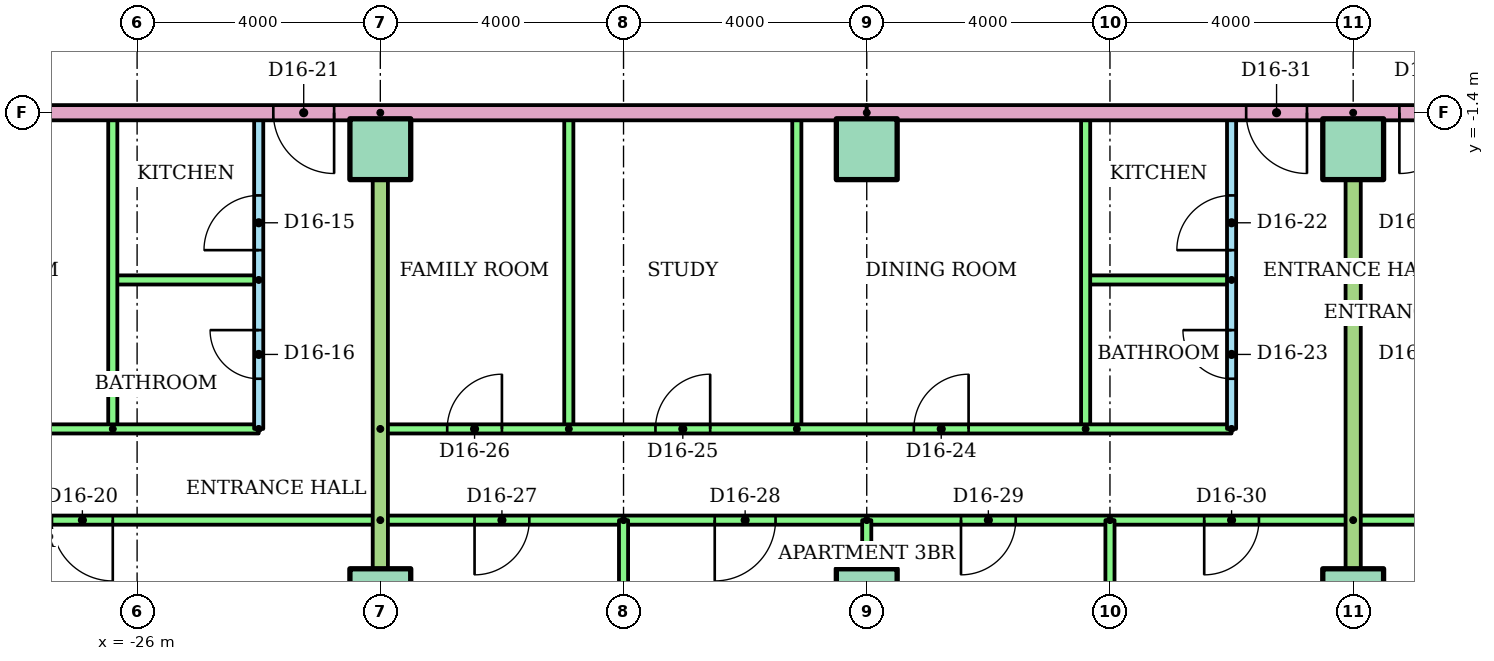
"""IFC4 building model, lengths in metres.
Left out: names, types, materials, properties, quantities, classifications, styles, units other than length and angle.
Written with IfcOpenShell. Run it as: python <this file> out.ifc"""

import sys

from ifc_helpers import new_model, si_unit, direction, frame, frame_2d, origin, origin_2d, place, context, subcontext, project, spatial, rectangle, extrude, element, fill, save


model = new_model("IFC4")
c1 = context("Model", 3, precision=1e-05, world=origin(), true_north=direction((0.0, 1.0)))
c2 = subcontext(c1, "Body", "Model", "MODEL_VIEW")
j1 = project(units=[si_unit("LENGTHUNIT", "METRE"), si_unit("PLANEANGLEUNIT", "RADIAN")], contexts=[c1])
p1 = place(None, origin())
s1 = spatial("IfcSite", under=j1, at=p1, CompositionType="ELEMENT")
p2 = place(p1, origin())
s2 = spatial("IfcBuilding", under=s1, at=p2, CompositionType="ELEMENT")
p3 = place(p2, frame((0.0, 0.0, 60.8)))
s3 = spatial("IfcBuildingStorey", under=s2, at=p3, CompositionType="ELEMENT", Elevation=60.8)
for number, where in (
    (1, (-22.0, -9.4, 0.0)),
    (2, (-14.0, -9.4, 0.0)),
    (3, (-6.0, -9.4, 0.0)),
    (4, (-22.0, -2.0, 0.0)),
    (5, (-14.0, -2.0, 0.0)),
    (6, (-6.0, -2.0, 0.0)),
):
    element("IfcColumn", number, at=place(p3, frame(where)), inside=s3, PredefinedType="COLUMN", context=c2, shape_type="SweptSolid", body=[
        extrude(rectangle(XDim=1.0, YDim=1.0, at=origin_2d()), origin(), (0.0, 0.0, 1.0), 3.2),
    ])
p4 = place(p3, frame((-24.0, -6.6, 0.0), z_axis=(0.0, 0.0, 1.0), x_axis=(0.0, 1.0, 0.0)))
e7 = element("IfcWall", 7, at=p4, inside=s3, PredefinedType="PARTITIONING", context=c2, shape_type="SweptSolid", body=[
    extrude(rectangle(XDim=5.2, YDim=0.15, at=frame_2d((2.6, 0.0))), origin(), (0.0, 0.0, 1.0), 2.4),
])
p5 = place(p4, frame((2.94, 0.0, 0.0)))
e8 = element("IfcOpeningElement", 8, at=p5, cuts=e7, PredefinedType="OPENING", context=c2, shape_type="SweptSolid", body=[
    extrude(rectangle(XDim=0.9, YDim=2.1, at=frame_2d((0.45, 1.05))), frame((0.0, 0.085, 0.0), z_axis=(0.0, -1.0, 0.0), x_axis=(1.0, 0.0, 0.0)), (0.0, 0.0, 1.0), 0.17),
])
p6 = place(p4, frame((0.825, 0.0, 0.0)))
e9 = element("IfcOpeningElement", 9, at=p6, cuts=e7, PredefinedType="OPENING", context=c2, shape_type="SweptSolid", body=[
    extrude(rectangle(XDim=0.8, YDim=2.1, at=frame_2d((0.4, 1.05))), frame((0.0, 0.085, 0.0), z_axis=(0.0, -1.0, 0.0), x_axis=(1.0, 0.0, 0.0)), (0.0, 0.0, 1.0), 0.17),
])
p7 = place(p3, frame((-24.0, -4.15, 0.0), z_axis=(0.0, 0.0, 1.0), x_axis=(-1.0, 0.0, 0.0)))
e10 = element("IfcWall", 10, at=p7, inside=s3, PredefinedType="PARTITIONING", context=c2, shape_type="SweptSolid", body=[
    extrude(rectangle(XDim=2.4, YDim=0.15, at=frame_2d((1.2, 0.0))), origin(), (0.0, 0.0, 1.0), 2.4),
])
p8 = place(p3, frame((-26.4, -6.6, 0.0), z_axis=(0.0, 0.0, 1.0), x_axis=(0.0, 1.0, 0.0)))
e11 = element("IfcWall", 11, at=p8, inside=s3, PredefinedType="PARTITIONING", context=c2, shape_type="SweptSolid", body=[
    extrude(rectangle(XDim=5.2, YDim=0.15, at=frame_2d((2.6, 0.0))), origin(), (0.0, 0.0, 1.0), 2.4),
])
p9 = place(p3, frame((-36.51, -6.6, 0.0)))
e12 = element("IfcWall", 12, at=p9, inside=s3, PredefinedType="PARTITIONING", context=c2, shape_type="SweptSolid", body=[
    extrude(rectangle(XDim=12.51, YDim=0.15, at=frame_2d((6.255, 0.0))), origin(), (0.0, 0.0, 1.0), 2.4),
])
p10 = place(p9, frame((7.535, 0.0, 0.0)))
e13 = element("IfcOpeningElement", 13, at=p10, cuts=e12, PredefinedType="OPENING", context=c2, shape_type="SweptSolid", body=[
    extrude(rectangle(XDim=0.9, YDim=2.1, at=frame_2d((0.45, 1.05))), frame((0.0, 0.085, 0.0), z_axis=(0.0, -1.0, 0.0), x_axis=(1.0, 0.0, 0.0)), (0.0, 0.0, 1.0), 0.17),
])
p11 = place(p9, frame((2.585, 0.0, 0.0)))
e14 = element("IfcOpeningElement", 14, at=p11, cuts=e12, PredefinedType="OPENING", context=c2, shape_type="SweptSolid", body=[
    extrude(rectangle(XDim=0.9, YDim=2.1, at=frame_2d((0.45, 1.05))), frame((0.0, 0.085, 0.0), z_axis=(0.0, -1.0, 0.0), x_axis=(1.0, 0.0, 0.0)), (0.0, 0.0, 1.0), 0.17),
])
p12 = place(p3, frame((-22.0, -8.1, 0.0), z_axis=(0.0, 0.0, 1.0), x_axis=(-1.0, 0.0, 0.0)))
e15 = element("IfcWall", 15, at=p12, inside=s3, PredefinedType="PARTITIONING", context=c2, shape_type="SweptSolid", body=[
    extrude(rectangle(XDim=14.51, YDim=0.15, at=frame_2d((7.255, 0.0))), origin(), (0.0, 0.0, 1.0), 2.4),
])
p13 = place(p12, frame((11.6, 0.0, 0.0)))
e16 = element("IfcOpeningElement", 16, at=p13, cuts=e15, PredefinedType="OPENING", context=c2, shape_type="SweptSolid", body=[
    extrude(rectangle(XDim=0.9, YDim=2.1, at=frame_2d((0.45, 1.05))), frame((0.0, 0.085, 0.0), z_axis=(0.0, -1.0, 0.0), x_axis=(1.0, 0.0, 0.0)), (0.0, 0.0, 1.0), 0.17),
])
p14 = place(p12, frame((4.4, 0.0, 0.0)))
e17 = element("IfcOpeningElement", 17, at=p14, cuts=e15, PredefinedType="OPENING", context=c2, shape_type="SweptSolid", body=[
    extrude(rectangle(XDim=1.0, YDim=2.1, at=frame_2d((0.5, 1.05))), frame((0.0, 0.085, 0.0), z_axis=(0.0, -1.0, 0.0), x_axis=(1.0, 0.0, 0.0)), (0.0, 0.0, 1.0), 0.17),
])
p15 = place(p3, frame((-8.0, -6.6, 0.0), z_axis=(0.0, 0.0, 1.0), x_axis=(0.0, 1.0, 0.0)))
e18 = element("IfcWall", 18, at=p15, inside=s3, PredefinedType="PARTITIONING", context=c2, shape_type="SweptSolid", body=[
    extrude(rectangle(XDim=5.2, YDim=0.15, at=frame_2d((2.6, 0.0))), origin(), (0.0, 0.0, 1.0), 2.4),
])
p16 = place(p15, frame((2.94, 0.0, 0.0)))
e19 = element("IfcOpeningElement", 19, at=p16, cuts=e18, PredefinedType="OPENING", context=c2, shape_type="SweptSolid", body=[
    extrude(rectangle(XDim=0.9, YDim=2.1, at=frame_2d((0.45, 1.05))), frame((0.0, 0.085, 0.0), z_axis=(0.0, -1.0, 0.0), x_axis=(1.0, 0.0, 0.0)), (0.0, 0.0, 1.0), 0.17),
])
p17 = place(p15, frame((0.825, 0.0, 0.0)))
e20 = element("IfcOpeningElement", 20, at=p17, cuts=e18, PredefinedType="OPENING", context=c2, shape_type="SweptSolid", body=[
    extrude(rectangle(XDim=0.8, YDim=2.1, at=frame_2d((0.4, 1.05))), frame((0.0, 0.085, 0.0), z_axis=(0.0, -1.0, 0.0), x_axis=(1.0, 0.0, 0.0)), (0.0, 0.0, 1.0), 0.17),
])
p18 = place(p3, frame((-8.0, -4.15, 0.0), z_axis=(0.0, 0.0, 1.0), x_axis=(-1.0, 0.0, 0.0)))
e21 = element("IfcWall", 21, at=p18, inside=s3, PredefinedType="PARTITIONING", context=c2, shape_type="SweptSolid", body=[
    extrude(rectangle(XDim=2.4, YDim=0.15, at=frame_2d((1.2, 0.0))), origin(), (0.0, 0.0, 1.0), 2.4),
])
for number, where, z_axis, x_axis in (
    (22, (-10.4, -6.6, 0.0), (0.0, 0.0, 1.0), (0.0, 1.0, 0.0)),
    (23, (-15.15, -6.6, 0.0), (0.0, 0.0, 1.0), (0.0, 1.0, 0.0)),
    (24, (-18.9, -6.6, 0.0), (0.0, 0.0, 1.0), (0.0, 1.0, 0.0)),
):
    element("IfcWall", number, at=place(p3, frame(where, z_axis=z_axis, x_axis=x_axis)), inside=s3, PredefinedType="PARTITIONING", context=c2, shape_type="SweptSolid", body=[
        extrude(rectangle(XDim=5.2, YDim=0.15, at=frame_2d((2.6, 0.0))), origin(), (0.0, 0.0, 1.0), 2.4),
    ])
p19 = place(p3, frame((-22.0, -6.6, 0.0)))
e25 = element("IfcWall", 25, at=p19, inside=s3, PredefinedType="PARTITIONING", context=c2, shape_type="SweptSolid", body=[
    extrude(rectangle(XDim=14.0, YDim=0.15, at=frame_2d((7.0, 0.0))), origin(), (0.0, 0.0, 1.0), 2.4),
])
p20 = place(p19, frame((8.775, 0.0, 0.0)))
e26 = element("IfcOpeningElement", 26, at=p20, cuts=e25, PredefinedType="OPENING", context=c2, shape_type="SweptSolid", body=[
    extrude(rectangle(XDim=0.9, YDim=2.1, at=frame_2d((0.45, 1.05))), frame((0.0, 0.085, 0.0), z_axis=(0.0, -1.0, 0.0), x_axis=(1.0, 0.0, 0.0)), (0.0, 0.0, 1.0), 0.17),
])
p21 = place(p19, frame((4.525, 0.0, 0.0)))
e27 = element("IfcOpeningElement", 27, at=p21, cuts=e25, PredefinedType="OPENING", context=c2, shape_type="SweptSolid", body=[
    extrude(rectangle(XDim=0.9, YDim=2.1, at=frame_2d((0.45, 1.05))), frame((0.0, 0.085, 0.0), z_axis=(0.0, -1.0, 0.0), x_axis=(1.0, 0.0, 0.0)), (0.0, 0.0, 1.0), 0.17),
])
p22 = place(p19, frame((1.1, 0.0, 0.0)))
e28 = element("IfcOpeningElement", 28, at=p22, cuts=e25, PredefinedType="OPENING", context=c2, shape_type="SweptSolid", body=[
    extrude(rectangle(XDim=0.9, YDim=2.1, at=frame_2d((0.45, 1.05))), frame((0.0, 0.085, 0.0), z_axis=(0.0, -1.0, 0.0), x_axis=(1.0, 0.0, 0.0)), (0.0, 0.0, 1.0), 0.17),
])
p23 = place(p3, frame((-6.0, -8.1, 0.0), z_axis=(0.0, 0.0, 1.0), x_axis=(-1.0, 0.0, 0.0)))
e29 = element("IfcWall", 29, at=p23, inside=s3, PredefinedType="PARTITIONING", context=c2, shape_type="SweptSolid", body=[
    extrude(rectangle(XDim=16.0, YDim=0.15, at=frame_2d((8.0, 0.0))), origin(), (0.0, 0.0, 1.0), 2.4),
])
p24 = place(p23, frame((13.55, 0.0, 0.0)))
e30 = element("IfcOpeningElement", 30, at=p24, cuts=e29, PredefinedType="OPENING", context=c2, shape_type="SweptSolid", body=[
    extrude(rectangle(XDim=0.9, YDim=2.1, at=frame_2d((0.45, 1.05))), frame((0.0, 0.085, 0.0), z_axis=(0.0, -1.0, 0.0), x_axis=(1.0, 0.0, 0.0)), (0.0, 0.0, 1.0), 0.17),
])
p25 = place(p23, frame((9.5, 0.0, 0.0)))
e31 = element("IfcOpeningElement", 31, at=p25, cuts=e29, PredefinedType="OPENING", context=c2, shape_type="SweptSolid", body=[
    extrude(rectangle(XDim=1.0, YDim=2.1, at=frame_2d((0.5, 1.05))), frame((0.0, 0.085, 0.0), z_axis=(0.0, -1.0, 0.0), x_axis=(1.0, 0.0, 0.0)), (0.0, 0.0, 1.0), 0.17),
])
p26 = place(p23, frame((5.55, 0.0, 0.0)))
e32 = element("IfcOpeningElement", 32, at=p26, cuts=e29, PredefinedType="OPENING", context=c2, shape_type="SweptSolid", body=[
    extrude(rectangle(XDim=0.9, YDim=2.1, at=frame_2d((0.45, 1.05))), frame((0.0, 0.085, 0.0), z_axis=(0.0, -1.0, 0.0), x_axis=(1.0, 0.0, 0.0)), (0.0, 0.0, 1.0), 0.17),
])
p27 = place(p23, frame((1.55, 0.0, 0.0)))
e33 = element("IfcOpeningElement", 33, at=p27, cuts=e29, PredefinedType="OPENING", context=c2, shape_type="SweptSolid", body=[
    extrude(rectangle(XDim=0.9, YDim=2.1, at=frame_2d((0.45, 1.05))), frame((0.0, 0.085, 0.0), z_axis=(0.0, -1.0, 0.0), x_axis=(1.0, 0.0, 0.0)), (0.0, 0.0, 1.0), 0.17),
])
p28 = place(p3, frame((-18.0, -8.1, 0.0), z_axis=(0.0, 0.0, 1.0), x_axis=(0.0, -1.0, 0.0)))
e34 = element("IfcWall", 34, at=p28, inside=s3, PredefinedType="PARTITIONING", context=c2, shape_type="SweptSolid", body=[
    extrude(rectangle(XDim=8.021, YDim=0.15, at=frame_2d((4.01, 0.0))), origin(), (0.0, 0.0, 1.0), 2.4),
])
p29 = place(p3, frame((-14.0, -8.1, 0.0), z_axis=(0.0, 0.0, 1.0), x_axis=(0.0, -1.0, 0.0)))
e35 = element("IfcWall", 35, at=p29, inside=s3, PredefinedType="PARTITIONING", context=c2, shape_type="SweptSolid", body=[
    extrude(rectangle(XDim=8.01, YDim=0.15, at=frame_2d((4.005, 0.0))), origin(), (0.0, 0.0, 1.0), 2.4),
])
p30 = place(p3, frame((-10.0, -8.1, 0.0), z_axis=(0.0, 0.0, 1.0), x_axis=(0.0, -1.0, 0.0)))
e36 = element("IfcWall", 36, at=p30, inside=s3, PredefinedType="PARTITIONING", context=c2, shape_type="SweptSolid", body=[
    extrude(rectangle(XDim=8.021, YDim=0.15, at=frame_2d((4.01, 0.0))), origin(), (0.0, 0.0, 1.0), 2.4),
])
p31 = place(p3, frame((-22.0, -1.4, 0.0), z_axis=(0.0, 0.0, 1.0), x_axis=(0.0, -1.0, 0.0)))
e37 = element("IfcWall", 37, at=p31, inside=s3, PredefinedType="PARTITIONING", context=c2, shape_type="SweptSolid", body=[
    extrude(rectangle(XDim=14.71, YDim=0.25, at=frame_2d((7.355, 0.0))), origin(), (0.0, 0.0, 1.0), 2.4),
])
p32 = place(p3, frame((10.0, -8.1, 0.0), z_axis=(0.0, 0.0, 1.0), x_axis=(-1.0, 0.0, 0.0)))
e38 = element("IfcWall", 38, at=p32, inside=s3, PredefinedType="PARTITIONING", context=c2, shape_type="SweptSolid", body=[
    extrude(rectangle(XDim=16.0, YDim=0.15, at=frame_2d((8.0, 0.0))), origin(), (0.0, 0.0, 1.0), 2.4),
])
p33 = place(p32, frame((13.55, 0.0, 0.0)))
e39 = element("IfcOpeningElement", 39, at=p33, cuts=e38, PredefinedType="OPENING", context=c2, shape_type="SweptSolid", body=[
    extrude(rectangle(XDim=0.9, YDim=2.1, at=frame_2d((0.45, 1.05))), frame((0.0, 0.085, 0.0), z_axis=(0.0, -1.0, 0.0), x_axis=(1.0, 0.0, 0.0)), (0.0, 0.0, 1.0), 0.17),
])
p34 = place(p32, frame((9.5, 0.0, 0.0)))
e40 = element("IfcOpeningElement", 40, at=p34, cuts=e38, PredefinedType="OPENING", context=c2, shape_type="SweptSolid", body=[
    extrude(rectangle(XDim=1.0, YDim=2.1, at=frame_2d((0.5, 1.05))), frame((0.0, 0.085, 0.0), z_axis=(0.0, -1.0, 0.0), x_axis=(1.0, 0.0, 0.0)), (0.0, 0.0, 1.0), 0.17),
])
p35 = place(p32, frame((5.55, 0.0, 0.0)))
e41 = element("IfcOpeningElement", 41, at=p35, cuts=e38, PredefinedType="OPENING", context=c2, shape_type="SweptSolid", body=[
    extrude(rectangle(XDim=0.9, YDim=2.1, at=frame_2d((0.45, 1.05))), frame((0.0, 0.085, 0.0), z_axis=(0.0, -1.0, 0.0), x_axis=(1.0, 0.0, 0.0)), (0.0, 0.0, 1.0), 0.17),
])
p36 = place(p32, frame((1.55, 0.0, 0.0)))
e42 = element("IfcOpeningElement", 42, at=p36, cuts=e38, PredefinedType="OPENING", context=c2, shape_type="SweptSolid", body=[
    extrude(rectangle(XDim=0.9, YDim=2.1, at=frame_2d((0.45, 1.05))), frame((0.0, 0.085, 0.0), z_axis=(0.0, -1.0, 0.0), x_axis=(1.0, 0.0, 0.0)), (0.0, 0.0, 1.0), 0.17),
])
p37 = place(p3, frame((-6.0, -1.4, 0.0), z_axis=(0.0, 0.0, 1.0), x_axis=(0.0, -1.0, 0.0)))
e43 = element("IfcWall", 43, at=p37, inside=s3, PredefinedType="PARTITIONING", context=c2, shape_type="SweptSolid", body=[
    extrude(rectangle(XDim=14.71, YDim=0.25, at=frame_2d((7.355, 0.0))), origin(), (0.0, 0.0, 1.0), 2.4),
])
p38 = place(p3, frame((-14.0, -1.4, 0.0), z_axis=(0.0, 0.0, 1.0), x_axis=(-1.0, 0.0, 0.0)))
e44 = element("IfcWall", 44, at=p38, inside=s3, PredefinedType="PARTITIONING", context=c2, shape_type="SweptSolid", body=[
    extrude(rectangle(XDim=15.0, YDim=0.25, at=frame_2d((7.5, 0.0))), origin(), (0.0, 0.0, 1.0), 2.4),
])
p39 = place(p38, frame((8.76, 0.0, 0.0)))
e45 = element("IfcOpeningElement", 45, at=p39, cuts=e44, PredefinedType="OPENING", context=c2, shape_type="SweptSolid", body=[
    extrude(rectangle(XDim=1.0, YDim=2.1, at=frame_2d((0.5, 1.05))), frame((0.0, 0.135, 0.0), z_axis=(0.0, -1.0, 0.0), x_axis=(1.0, 0.0, 0.0)), (0.0, 0.0, 1.0), 0.27),
])
p40 = place(p3, frame((14.0, -1.4, 0.0), z_axis=(0.0, 0.0, 1.0), x_axis=(-1.0, 0.0, 0.0)))
e46 = element("IfcWall", 46, at=p40, inside=s3, PredefinedType="PARTITIONING", context=c2, shape_type="SweptSolid", body=[
    extrude(rectangle(XDim=28.0, YDim=0.25, at=frame_2d((14.0, 0.0))), origin(), (0.0, 0.0, 1.0), 2.4),
])
p41 = place(p40, frame((20.76, 0.0, 0.0)))
e47 = element("IfcOpeningElement", 47, at=p41, cuts=e46, PredefinedType="OPENING", context=c2, shape_type="SweptSolid", body=[
    extrude(rectangle(XDim=1.0, YDim=2.1, at=frame_2d((0.5, 1.05))), frame((0.0, 0.135, 0.0), z_axis=(0.0, -1.0, 0.0), x_axis=(1.0, 0.0, 0.0)), (0.0, 0.0, 1.0), 0.27),
])
p42 = place(p40, frame((18.24, 0.0, 0.0)))
e48 = element("IfcOpeningElement", 48, at=p42, cuts=e46, PredefinedType="OPENING", context=c2, shape_type="SweptSolid", body=[
    extrude(rectangle(XDim=1.0, YDim=2.1, at=frame_2d((0.5, 1.05))), frame((0.0, 0.135, 0.0), z_axis=(0.0, -1.0, 0.0), x_axis=(1.0, 0.0, 0.0)), (0.0, 0.0, 1.0), 0.27),
])
p43 = place(p40, frame((2.24, 0.0, 0.0)))
e49 = element("IfcOpeningElement", 49, at=p43, cuts=e46, PredefinedType="OPENING", context=c2, shape_type="SweptSolid", body=[
    extrude(rectangle(XDim=1.0, YDim=2.1, at=frame_2d((0.5, 1.05))), frame((0.0, 0.135, 0.0), z_axis=(0.0, -1.0, 0.0), x_axis=(1.0, 0.0, 0.0)), (0.0, 0.0, 1.0), 0.27),
])
p44 = place(p5, origin())
e50 = element("IfcDoor", 50, at=p44, inside=s3, OperationType="SINGLE_SWING_LEFT", PredefinedType="DOOR", context=c2, shape_type="SweptSolid", body=[
    extrude(rectangle(XDim=0.9, YDim=2.1, at=frame_2d((0.45, 1.05))), frame((0.0, 0.025, 0.0), z_axis=(0.0, -1.0, 0.0), x_axis=(1.0, 0.0, 0.0)), (0.0, 0.0, 1.0), 0.05),
])
fill(e8, e50)
p45 = place(p6, origin())
e51 = element("IfcDoor", 51, at=p45, inside=s3, OperationType="SINGLE_SWING_RIGHT", PredefinedType="DOOR", context=c2, shape_type="SweptSolid", body=[
    extrude(rectangle(XDim=0.8, YDim=2.1, at=frame_2d((0.4, 1.05))), frame((0.0, 0.025, 0.0), z_axis=(0.0, -1.0, 0.0), x_axis=(1.0, 0.0, 0.0)), (0.0, 0.0, 1.0), 0.05),
])
fill(e9, e51)
p46 = place(p14, origin())
e52 = element("IfcDoor", 52, at=p46, inside=s3, OperationType="SINGLE_SWING_LEFT", PredefinedType="DOOR", context=c2, shape_type="SweptSolid", body=[
    extrude(rectangle(XDim=1.0, YDim=2.1, at=frame_2d((0.5, 1.05))), frame((0.0, 0.025, 0.0), z_axis=(0.0, -1.0, 0.0), x_axis=(1.0, 0.0, 0.0)), (0.0, 0.0, 1.0), 0.05),
])
fill(e17, e52)
p47 = place(p39, origin())
e53 = element("IfcDoor", 53, at=p47, inside=s3, OperationType="SINGLE_SWING_LEFT", PredefinedType="DOOR", context=c2, shape_type="SweptSolid", body=[
    extrude(rectangle(XDim=1.0, YDim=2.1, at=frame_2d((0.5, 1.05))), frame((0.0, 0.025, 0.0), z_axis=(0.0, -1.0, 0.0), x_axis=(1.0, 0.0, 0.0)), (0.0, 0.0, 1.0), 0.05),
])
fill(e45, e53)
p48 = place(p16, origin())
e54 = element("IfcDoor", 54, at=p48, inside=s3, OperationType="SINGLE_SWING_LEFT", PredefinedType="DOOR", context=c2, shape_type="SweptSolid", body=[
    extrude(rectangle(XDim=0.9, YDim=2.1, at=frame_2d((0.45, 1.05))), frame((0.0, 0.025, 0.0), z_axis=(0.0, -1.0, 0.0), x_axis=(1.0, 0.0, 0.0)), (0.0, 0.0, 1.0), 0.05),
])
fill(e19, e54)
p49 = place(p17, origin())
e55 = element("IfcDoor", 55, at=p49, inside=s3, OperationType="SINGLE_SWING_RIGHT", PredefinedType="DOOR", context=c2, shape_type="SweptSolid", body=[
    extrude(rectangle(XDim=0.8, YDim=2.1, at=frame_2d((0.4, 1.05))), frame((0.0, 0.025, 0.0), z_axis=(0.0, -1.0, 0.0), x_axis=(1.0, 0.0, 0.0)), (0.0, 0.0, 1.0), 0.05),
])
fill(e20, e55)
p50 = place(p20, origin())
e56 = element("IfcDoor", 56, at=p50, inside=s3, OperationType="SINGLE_SWING_RIGHT", PredefinedType="DOOR", context=c2, shape_type="SweptSolid", body=[
    extrude(rectangle(XDim=0.9, YDim=2.1, at=frame_2d((0.45, 1.05))), frame((0.0, 0.025, 0.0), z_axis=(0.0, -1.0, 0.0), x_axis=(1.0, 0.0, 0.0)), (0.0, 0.0, 1.0), 0.05),
])
fill(e26, e56)
p51 = place(p21, origin())
e57 = element("IfcDoor", 57, at=p51, inside=s3, OperationType="SINGLE_SWING_RIGHT", PredefinedType="DOOR", context=c2, shape_type="SweptSolid", body=[
    extrude(rectangle(XDim=0.9, YDim=2.1, at=frame_2d((0.45, 1.05))), frame((0.0, 0.025, 0.0), z_axis=(0.0, -1.0, 0.0), x_axis=(1.0, 0.0, 0.0)), (0.0, 0.0, 1.0), 0.05),
])
fill(e27, e57)
p52 = place(p22, origin())
e58 = element("IfcDoor", 58, at=p52, inside=s3, OperationType="SINGLE_SWING_RIGHT", PredefinedType="DOOR", context=c2, shape_type="SweptSolid", body=[
    extrude(rectangle(XDim=0.9, YDim=2.1, at=frame_2d((0.45, 1.05))), frame((0.0, 0.025, 0.0), z_axis=(0.0, -1.0, 0.0), x_axis=(1.0, 0.0, 0.0)), (0.0, 0.0, 1.0), 0.05),
])
fill(e28, e58)
p53 = place(p24, origin())
e59 = element("IfcDoor", 59, at=p53, inside=s3, OperationType="SINGLE_SWING_RIGHT", PredefinedType="DOOR", context=c2, shape_type="SweptSolid", body=[
    extrude(rectangle(XDim=0.9, YDim=2.1, at=frame_2d((0.45, 1.05))), frame((0.0, 0.025, 0.0), z_axis=(0.0, -1.0, 0.0), x_axis=(1.0, 0.0, 0.0)), (0.0, 0.0, 1.0), 0.05),
])
fill(e30, e59)
p54 = place(p25, origin())
e60 = element("IfcDoor", 60, at=p54, inside=s3, OperationType="SINGLE_SWING_RIGHT", PredefinedType="DOOR", context=c2, shape_type="SweptSolid", body=[
    extrude(rectangle(XDim=1.0, YDim=2.1, at=frame_2d((0.5, 1.05))), frame((0.0, 0.025, 0.0), z_axis=(0.0, -1.0, 0.0), x_axis=(1.0, 0.0, 0.0)), (0.0, 0.0, 1.0), 0.05),
])
fill(e31, e60)
p55 = place(p26, origin())
e61 = element("IfcDoor", 61, at=p55, inside=s3, OperationType="SINGLE_SWING_RIGHT", PredefinedType="DOOR", context=c2, shape_type="SweptSolid", body=[
    extrude(rectangle(XDim=0.9, YDim=2.1, at=frame_2d((0.45, 1.05))), frame((0.0, 0.025, 0.0), z_axis=(0.0, -1.0, 0.0), x_axis=(1.0, 0.0, 0.0)), (0.0, 0.0, 1.0), 0.05),
])
fill(e32, e61)
p56 = place(p27, origin())
e62 = element("IfcDoor", 62, at=p56, inside=s3, OperationType="SINGLE_SWING_RIGHT", PredefinedType="DOOR", context=c2, shape_type="SweptSolid", body=[
    extrude(rectangle(XDim=0.9, YDim=2.1, at=frame_2d((0.45, 1.05))), frame((0.0, 0.025, 0.0), z_axis=(0.0, -1.0, 0.0), x_axis=(1.0, 0.0, 0.0)), (0.0, 0.0, 1.0), 0.05),
])
fill(e33, e62)
p57 = place(p41, origin())
e63 = element("IfcDoor", 63, at=p57, inside=s3, OperationType="SINGLE_SWING_LEFT", PredefinedType="DOOR", context=c2, shape_type="SweptSolid", body=[
    extrude(rectangle(XDim=1.0, YDim=2.1, at=frame_2d((0.5, 1.05))), frame((0.0, 0.025, 0.0), z_axis=(0.0, -1.0, 0.0), x_axis=(1.0, 0.0, 0.0)), (0.0, 0.0, 1.0), 0.05),
])
fill(e47, e63)
p58 = place(p42, origin())
e64 = element("IfcDoor", 64, at=p58, inside=s3, OperationType="SINGLE_SWING_RIGHT", PredefinedType="DOOR", context=c2, shape_type="SweptSolid", body=[
    extrude(rectangle(XDim=1.0, YDim=2.1, at=frame_2d((0.5, 1.05))), frame((0.0, 0.025, 0.0), z_axis=(0.0, -1.0, 0.0), x_axis=(1.0, 0.0, 0.0)), (0.0, 0.0, 1.0), 0.05),
])
fill(e48, e64)
save(model, sys.argv[1])
